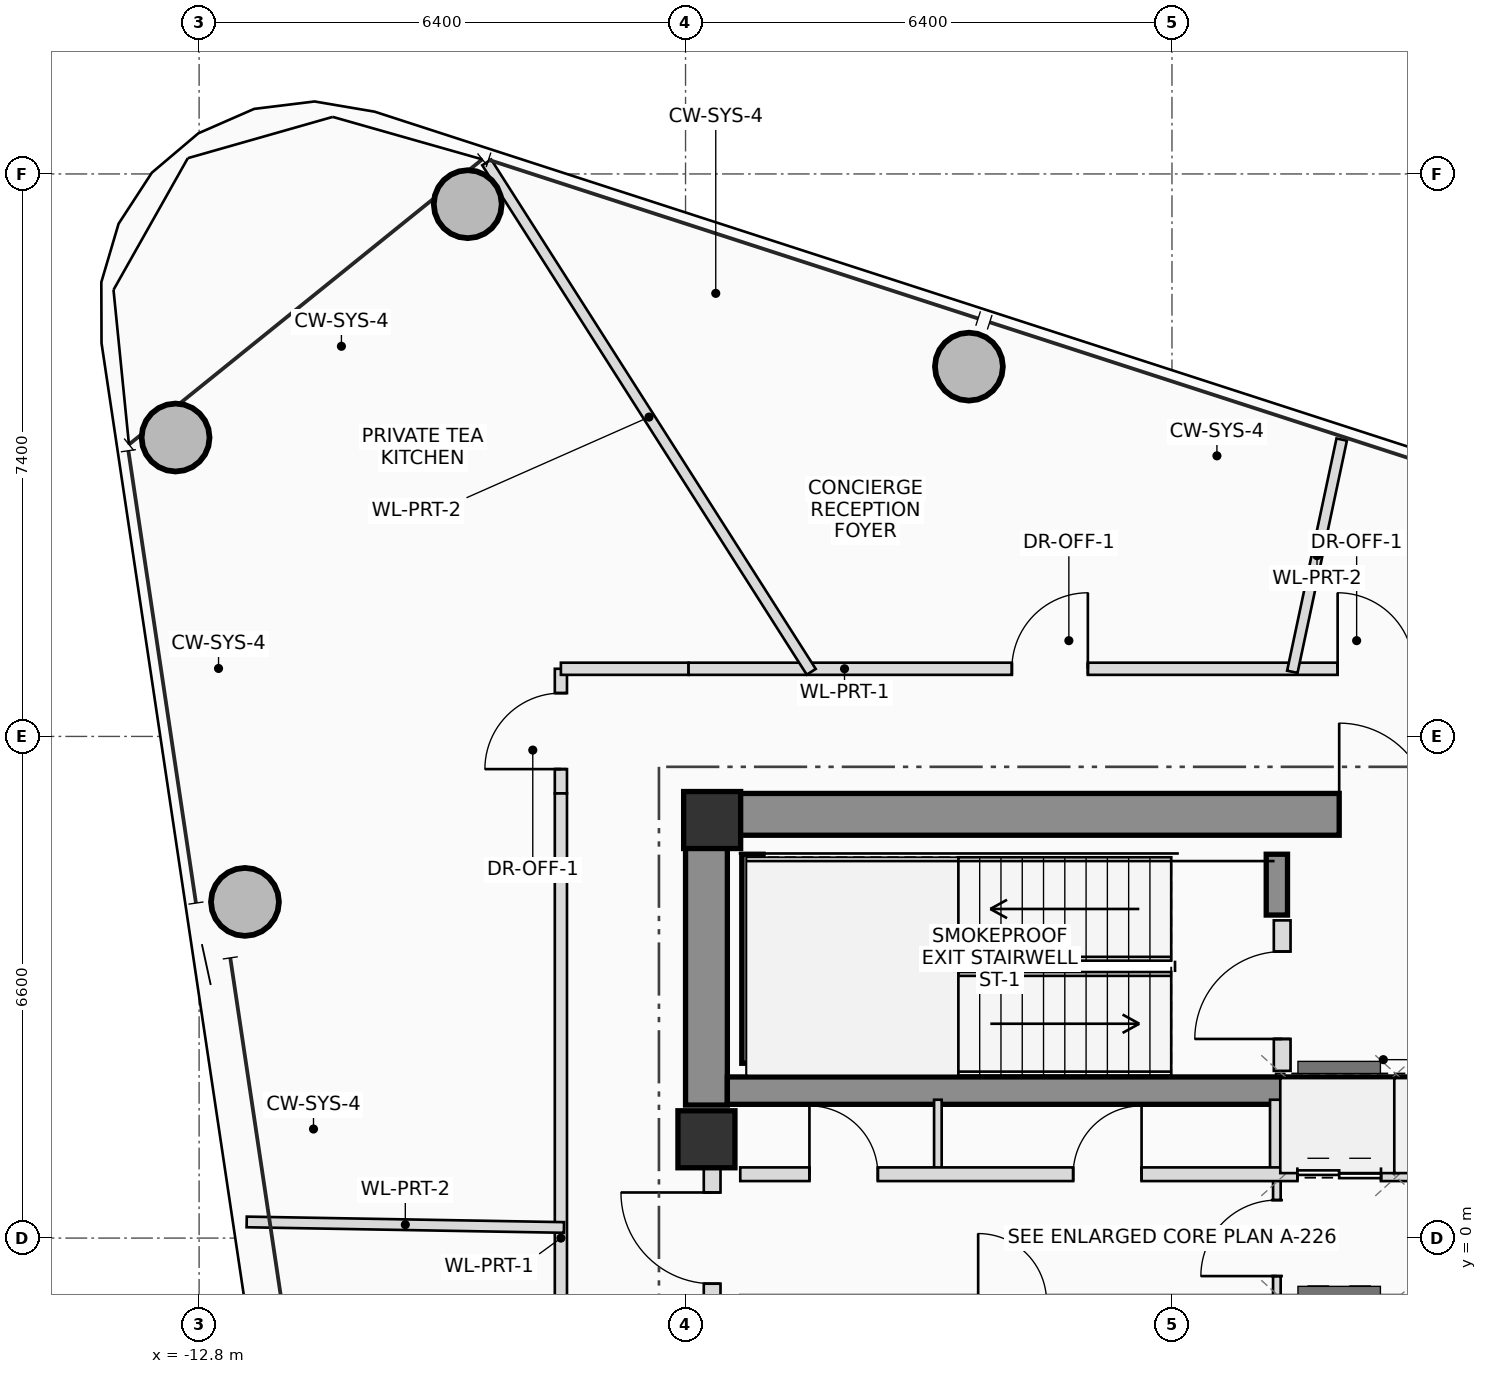
"""IFC4 building model, lengths in metres.
Left out: names, types, materials, properties, quantities, classifications, styles, units other than length and angle.
Written with IfcOpenShell. Run it as: python <this file> out.ifc"""

import sys

from ifc_helpers import new_model, si_unit, direction, frame, frame_2d, origin, origin_2d, place, context, subcontext, project, spatial, rectangle, hollow_circle, extrude, source, transform, mapped, element, fill, save


model = new_model("IFC4")
c1 = context("Model", 3, precision=1e-05, world=origin(), true_north=direction((0.0, 1.0)))
c2 = subcontext(c1, "Body", "Model", "MODEL_VIEW")
j1 = project(units=[si_unit("LENGTHUNIT", "METRE"), si_unit("PLANEANGLEUNIT", "RADIAN")], contexts=[c1])
p1 = place(None, origin())
s1 = spatial("IfcSite", under=j1, at=p1, CompositionType="ELEMENT")
p2 = place(p1, origin())
s2 = spatial("IfcBuilding", under=s1, at=p2, CompositionType="ELEMENT")
p3 = place(p2, frame((0.0, 0.0, 281.35)))
s3 = spatial("IfcBuildingStorey", under=s2, at=p3, CompositionType="ELEMENT", Elevation=281.35)
m1 = source(origin(), c2, "Body", "SweptSolid", [
    extrude(rectangle(XDim=0.75, YDim=0.75, at=origin_2d()), origin(), (0.0, 0.0, 1.0), 3.4),
])
p4 = place(p3, frame((-6.05, 5.5, 0.0), z_axis=(0.0, 0.0, 1.0), x_axis=(1.0, 0.0, 0.0)))
e1 = element("IfcColumn", 1, at=p4, inside=s3, PredefinedType="COLUMN", context=c2, shape_type="MappedRepresentation", body=[
    mapped(m1, transform((0.0, 0.0, 0.0), scale=1.0)),
])
p5 = place(p3, frame((-6.4, 5.575, 0.0), z_axis=(0.0, 0.0, 1.0), x_axis=(1.0, 0.0, 0.0)))
e2 = element("IfcWall", 2, at=p5, inside=s3, PredefinedType="SHEAR", context=c2, shape_type="SweptSolid", body=[
    extrude(rectangle(XDim=12.8, YDim=0.55, at=frame_2d((6.4, 0.0))), origin(), (0.0, 0.0, 1.0), 3.4),
])
p6 = place(p5, frame((8.6, 0.0, 0.0)))
e3 = element("IfcOpeningElement", 3, at=p6, cuts=e2, PredefinedType="OPENING", context=c2, shape_type="SweptSolid", body=[
    extrude(rectangle(XDim=1.2, YDim=2.2, at=frame_2d((0.6, 1.1))), frame((0.0, 0.285, 0.0), z_axis=(0.0, -1.0, 0.0), x_axis=(1.0, 0.0, 0.0)), (0.0, 0.0, 1.0), 0.57),
])
p7 = place(p3, frame((-6.125, 1.75, 0.0), z_axis=(0.0, 0.0, 1.0), x_axis=(0.0, 1.0, 0.0)))
e4 = element("IfcWall", 4, at=p7, inside=s3, PredefinedType="SHEAR", context=c2, shape_type="SweptSolid", body=[
    extrude(rectangle(XDim=3.55, YDim=0.55, at=frame_2d((1.775, 0.0))), origin(), (0.0, 0.0, 1.0), 3.4),
])
p8 = place(p3, frame((-5.85, 1.94, 0.0), z_axis=(0.0, 0.0, 1.0), x_axis=(1.0, 0.0, 0.0)))
e5 = element("IfcWall", 5, at=p8, inside=s3, PredefinedType="SHEAR", context=c2, shape_type="SweptSolid", body=[
    extrude(rectangle(XDim=11.7, YDim=0.36, at=frame_2d((5.85, 0.0))), origin(), (0.0, 0.0, 1.0), 3.4),
])
p9 = place(p3, frame((-5.52, 2.3, 0.0), z_axis=(0.0, 0.0, 1.0), x_axis=(0.0, 1.0, 0.0)))
e6 = element("IfcWall", 6, at=p9, inside=s3, PredefinedType="SHEAR", context=c2, shape_type="SweptSolid", body=[
    extrude(rectangle(XDim=2.75, YDim=0.28, at=frame_2d((1.375, 0.0))), origin(), (0.0, 0.0, 1.0), 3.4),
])
p10 = place(p3, frame((1.38, 4.25, 0.0), z_axis=(0.0, 0.0, 1.0), x_axis=(0.0, 1.0, 0.0)))
e7 = element("IfcWall", 7, at=p10, inside=s3, PredefinedType="SHEAR", context=c2, shape_type="SweptSolid", body=[
    extrude(rectangle(XDim=0.8, YDim=0.28, at=frame_2d((0.4, 0.0))), origin(), (0.0, 0.0, 1.0), 3.4),
])
p11 = place(p3, frame((-6.125, 1.3, 0.0), z_axis=(0.0, 0.0, 1.0), x_axis=(1.0, 0.0, 0.0)))
e8 = element("IfcColumn", 8, at=p11, inside=s3, PredefinedType="COLUMN", context=c2, shape_type="MappedRepresentation", body=[
    mapped(m1, transform((0.0, 0.0, 0.0), scale=1.0)),
])
m2 = source(origin(), c2, "Body", "SweptSolid", [
    extrude(hollow_circle(Radius=0.45, WallThickness=0.032, at=origin_2d()), origin(), (0.0, 0.0, 1.0), 3.4),
])
for number, where, z_axis, x_axis in (
    (9, (-2.672, 11.465, 0.0), (0.0, 0.0, 1.0), (1.0, 0.0, 0.0)),
    (10, (-9.266, 13.602, 0.0), (0.0, 0.0, 1.0), (1.0, 0.0, 0.0)),
    (11, (-13.11, 10.532, 0.0), (0.0, 0.0, 1.0), (1.0, 0.0, 0.0)),
    (12, (-12.197, 4.423, 0.0), (0.0, 0.0, 1.0), (1.0, 0.0, 0.0)),
):
    element("IfcColumn", number, at=place(p3, frame(where, z_axis=z_axis, x_axis=x_axis)), inside=s3, PredefinedType="COLUMN", context=c2, shape_type="MappedRepresentation", body=[
        mapped(m2, transform((0.0, 0.0, 0.0), scale=1.0)),
    ])
p12 = place(p3, frame((-6.05, -0.95, 0.0), z_axis=(0.0, 0.0, 1.0), x_axis=(0.0, 1.0, 0.0)))
e13 = element("IfcWall", 13, at=p12, inside=s3, PredefinedType="PLUMBINGWALL", context=c2, shape_type="SweptSolid", body=[
    extrude(rectangle(XDim=1.9, YDim=0.22, at=frame_2d((0.95, 0.0))), origin(), (0.0, 0.0, 1.0), 2.14),
])
p13 = place(p12, frame((0.35, 0.0, 0.0)))
e14 = element("IfcOpeningElement", 14, at=p13, cuts=e13, PredefinedType="OPENING", context=c2, shape_type="SweptSolid", body=[
    extrude(rectangle(XDim=1.2, YDim=2.2, at=frame_2d((0.6, 1.1))), frame((0.0, 0.12, 0.0), z_axis=(0.0, -1.0, 0.0), x_axis=(1.0, 0.0, 0.0)), (0.0, 0.0, 1.0), 0.24),
])
p14 = place(p3, frame((1.45, 2.2, 0.0), z_axis=(0.0, 0.0, 1.0), x_axis=(0.0, 1.0, 0.0)))
e15 = element("IfcWall", 15, at=p14, inside=s3, PredefinedType="PLUMBINGWALL", context=c2, shape_type="SweptSolid", body=[
    extrude(rectangle(XDim=1.98, YDim=0.22, at=frame_2d((0.99, 0.0))), origin(), (0.0, 0.0, 1.0), 3.16),
])
p15 = place(p14, frame((0.42, 0.0, 0.0)))
e16 = element("IfcOpeningElement", 16, at=p15, cuts=e15, PredefinedType="OPENING", context=c2, shape_type="SweptSolid", body=[
    extrude(rectangle(XDim=1.15, YDim=2.15, at=frame_2d((0.575, 1.075))), frame((0.0, 0.12, 0.0), z_axis=(0.0, -1.0, 0.0), x_axis=(1.0, 0.0, 0.0)), (0.0, 0.0, 1.0), 0.24),
])
p16 = place(p3, frame((1.38, -0.84, 0.0), z_axis=(0.0, 0.0, 1.0), x_axis=(0.0, 1.0, 0.0)))
e17 = element("IfcWall", 17, at=p16, inside=s3, PredefinedType="PARTITIONING", context=c2, shape_type="SweptSolid", body=[
    extrude(rectangle(XDim=1.68, YDim=0.1, at=frame_2d((0.84, 0.0))), origin(), (0.0, 0.0, 1.0), 3.16),
])
p17 = place(p16, frame((0.34, 0.0, 0.0)))
e18 = element("IfcOpeningElement", 18, at=p17, cuts=e17, PredefinedType="OPENING", context=c2, shape_type="SweptSolid", body=[
    extrude(rectangle(XDim=1.0, YDim=2.25, at=frame_2d((0.5, 1.125))), frame((0.0, 0.06, 0.0), z_axis=(0.0, -1.0, 0.0), x_axis=(1.0, 0.0, 0.0)), (0.0, 0.0, 1.0), 0.12),
])
p18 = place(p3, frame((-3.08, 0.84, 0.0), z_axis=(0.0, 0.0, 1.0), x_axis=(0.0, 1.0, 0.0)))
e19 = element("IfcWall", 19, at=p18, inside=s3, PredefinedType="PARTITIONING", context=c2, shape_type="SweptSolid", body=[
    extrude(rectangle(XDim=0.98, YDim=0.1, at=frame_2d((0.49, 0.0))), origin(), (0.0, 0.0, 1.0), 3.16),
])
for number, where, z_axis, x_axis in (
    (20, (1.38, 0.84, 0.0), (0.0, 0.0, 1.0), (0.0, 1.0, 0.0)),
    (21, (3.02, 0.84, 0.0), (0.0, 0.0, 1.0), (0.0, 1.0, 0.0)),
):
    element("IfcWall", number, at=place(p3, frame(where, z_axis=z_axis, x_axis=x_axis)), inside=s3, PredefinedType="PLUMBINGWALL", context=c2, shape_type="SweptSolid", body=[
        extrude(rectangle(XDim=0.98, YDim=0.18, at=frame_2d((0.49, 0.0))), origin(), (0.0, 0.0, 1.0), 3.16),
    ])
p19 = place(p3, frame((-5.68, 0.84, 0.0), z_axis=(0.0, 0.0, 1.0), x_axis=(1.0, 0.0, 0.0)))
e22 = element("IfcWall", 22, at=p19, inside=s3, PredefinedType="PLUMBINGWALL", context=c2, shape_type="SweptSolid", body=[
    extrude(rectangle(XDim=10.26, YDim=0.18, at=frame_2d((5.13, 0.0))), origin(), (0.0, 0.0, 1.0), 3.16),
])
p20 = place(p19, frame((0.91, 0.0, 0.0)))
e23 = element("IfcOpeningElement", 23, at=p20, cuts=e22, PredefinedType="OPENING", context=c2, shape_type="SweptSolid", body=[
    extrude(rectangle(XDim=0.9, YDim=2.05, at=frame_2d((0.45, 1.025))), frame((0.0, 0.1, 0.0), z_axis=(0.0, -1.0, 0.0), x_axis=(1.0, 0.0, 0.0)), (0.0, 0.0, 1.0), 0.2),
])
p21 = place(p19, frame((4.38, 0.0, 0.0)))
e24 = element("IfcOpeningElement", 24, at=p21, cuts=e22, PredefinedType="OPENING", context=c2, shape_type="SweptSolid", body=[
    extrude(rectangle(XDim=0.9, YDim=2.05, at=frame_2d((0.45, 1.025))), frame((0.0, 0.1, 0.0), z_axis=(0.0, -1.0, 0.0), x_axis=(1.0, 0.0, 0.0)), (0.0, 0.0, 1.0), 0.2),
])
p22 = place(p19, frame((7.33, 0.0, 0.0)))
e25 = element("IfcOpeningElement", 25, at=p22, cuts=e22, PredefinedType="OPENING", context=c2, shape_type="SweptSolid", body=[
    extrude(rectangle(XDim=1.1, YDim=2.2, at=frame_2d((0.55, 1.1))), frame((0.0, 0.1, 0.0), z_axis=(0.0, -1.0, 0.0), x_axis=(1.0, 0.0, 0.0)), (0.0, 0.0, 1.0), 0.2),
])
p23 = place(p19, frame((8.83, 0.0, 0.0)))
e26 = element("IfcOpeningElement", 26, at=p23, cuts=e22, PredefinedType="OPENING", context=c2, shape_type="SweptSolid", body=[
    extrude(rectangle(XDim=1.1, YDim=2.2, at=frame_2d((0.55, 1.1))), frame((0.0, 0.1, 0.0), z_axis=(0.0, -1.0, 0.0), x_axis=(1.0, 0.0, 0.0)), (0.0, 0.0, 1.0), 0.2),
])
p24 = place(p3, frame((-8.04, 5.85, 0.0), z_axis=(0.0, 0.0, 1.0), x_axis=(0.0, 1.0, 0.0)))
e27 = element("IfcWall", 27, at=p24, inside=s3, PredefinedType="PARTITIONING", context=c2, shape_type="SweptSolid", body=[
    extrude(rectangle(XDim=1.64, YDim=0.16, at=frame_2d((0.82, 0.0))), origin(), (0.0, 0.0, 1.0), 2.565),
])
p25 = place(p24, frame((0.32, 0.0, 0.0)))
e28 = element("IfcOpeningElement", 28, at=p25, cuts=e27, PredefinedType="OPENING", context=c2, shape_type="SweptSolid", body=[
    extrude(rectangle(XDim=1.0, YDim=2.25, at=frame_2d((0.5, 1.125))), frame((0.0, 0.09, 0.0), z_axis=(0.0, -1.0, 0.0), x_axis=(1.0, 0.0, 0.0)), (0.0, 0.0, 1.0), 0.18),
])
p26 = place(p3, frame((-8.04, 7.49, 0.0), z_axis=(0.0, 0.0, 1.0), x_axis=(1.0, 0.0, 0.0)))
e29 = element("IfcWall", 29, at=p26, inside=s3, PredefinedType="PARTITIONING", context=c2, shape_type="SweptSolid", body=[
    extrude(rectangle(XDim=1.68, YDim=0.16, at=frame_2d((0.84, 0.0))), origin(), (0.0, 0.0, 1.0), 2.565),
])
p27 = place(p3, frame((-6.36, 7.49, 0.0), z_axis=(0.0, 0.0, 1.0), x_axis=(1.0, 0.0, 0.0)))
e30 = element("IfcWall", 30, at=p27, inside=s3, PredefinedType="PARTITIONING", context=c2, shape_type="SweptSolid", body=[
    extrude(rectangle(XDim=9.81, YDim=0.16, at=frame_2d((4.905, 0.0))), origin(), (0.0, 0.0, 1.0), 2.565),
])
p28 = place(p27, frame((4.253, 0.0, 0.0)))
e31 = element("IfcOpeningElement", 31, at=p28, cuts=e30, PredefinedType="OPENING", context=c2, shape_type="SweptSolid", body=[
    extrude(rectangle(XDim=1.0, YDim=2.25, at=frame_2d((0.5, 1.125))), frame((0.0, 0.09, 0.0), z_axis=(0.0, -1.0, 0.0), x_axis=(1.0, 0.0, 0.0)), (0.0, 0.0, 1.0), 0.18),
])
p29 = place(p27, frame((8.54, 0.0, 0.0)))
e32 = element("IfcOpeningElement", 32, at=p29, cuts=e30, PredefinedType="OPENING", context=c2, shape_type="SweptSolid", body=[
    extrude(rectangle(XDim=1.0, YDim=2.25, at=frame_2d((0.5, 1.125))), frame((0.0, 0.09, 0.0), z_axis=(0.0, -1.0, 0.0), x_axis=(1.0, 0.0, 0.0)), (0.0, 0.0, 1.0), 0.18),
])
p30 = place(p3, frame((-8.04, -5.85, 0.0), z_axis=(0.0, 0.0, 1.0), x_axis=(0.0, 1.0, 0.0)))
e33 = element("IfcWall", 33, at=p30, inside=s3, PredefinedType="PARTITIONING", context=c2, shape_type="SweptSolid", body=[
    extrude(rectangle(XDim=11.7, YDim=0.16, at=frame_2d((5.85, 0.0))), origin(), (0.0, 0.0, 1.0), 2.565),
])
p31 = place(p3, frame((1.583, 7.45, 0.0), z_axis=(0.0, 0.0, 1.0), x_axis=(0.20788492722, 0.978153289129, 0.0)))
e34 = element("IfcWall", 34, at=p31, inside=s3, PredefinedType="PARTITIONING", context=c2, shape_type="SweptSolid", body=[
    extrude(rectangle(XDim=3.124, YDim=0.14, at=frame_2d((1.562, 0.0))), origin(), (0.0, 0.0, 1.0), 2.725),
])
p32 = place(p3, frame((-4.746, 7.45, 0.0), z_axis=(0.0, 0.0, 1.0), x_axis=(-0.537302825122, 0.843389396492, 0.0)))
e35 = element("IfcWall", 35, at=p32, inside=s3, PredefinedType="PARTITIONING", context=c2, shape_type="SweptSolid", body=[
    extrude(rectangle(XDim=7.947, YDim=0.14, at=frame_2d((3.973, 0.0))), origin(), (0.0, 0.0, 1.0), 2.565),
])
p33 = place(p3, frame((-8.0, 0.14, 0.0), z_axis=(0.0, 0.0, 1.0), x_axis=(-0.999848132876, 0.017427311435, 0.0)))
e36 = element("IfcWall", 36, at=p33, inside=s3, PredefinedType="PARTITIONING", context=c2, shape_type="SweptSolid", body=[
    extrude(rectangle(XDim=4.175, YDim=0.14, at=frame_2d((2.087, 0.0))), origin(), (0.0, 0.0, 1.0), 2.725),
])
p34 = place(p6, origin())
e37 = element("IfcDoor", 37, at=p34, inside=s3, OperationType="SINGLE_SWING_LEFT", PredefinedType="DOOR", context=c2, shape_type="SweptSolid", body=[
    extrude(rectangle(XDim=1.2, YDim=2.2, at=frame_2d((0.6, 1.1))), frame((0.0, 0.025, 0.0), z_axis=(0.0, -1.0, 0.0), x_axis=(1.0, 0.0, 0.0)), (0.0, 0.0, 1.0), 0.05),
])
fill(e3, e37)
p35 = place(p13, origin())
e38 = element("IfcDoor", 38, at=p35, inside=s3, OperationType="SINGLE_SWING_RIGHT", PredefinedType="DOOR", context=c2, shape_type="SweptSolid", body=[
    extrude(rectangle(XDim=1.2, YDim=2.2, at=frame_2d((0.6, 1.1))), frame((0.0, 0.025, 0.0), z_axis=(0.0, -1.0, 0.0), x_axis=(1.0, 0.0, 0.0)), (0.0, 0.0, 1.0), 0.05),
])
fill(e14, e38)
p36 = place(p15, origin())
e39 = element("IfcDoor", 39, at=p36, inside=s3, OperationType="SINGLE_SWING_LEFT", PredefinedType="DOOR", context=c2, shape_type="SweptSolid", body=[
    extrude(rectangle(XDim=1.15, YDim=2.15, at=frame_2d((0.575, 1.075))), frame((0.0, 0.025, 0.0), z_axis=(0.0, -1.0, 0.0), x_axis=(1.0, 0.0, 0.0)), (0.0, 0.0, 1.0), 0.05),
])
fill(e16, e39)
p37 = place(p17, origin())
e40 = element("IfcDoor", 40, at=p37, inside=s3, OperationType="SINGLE_SWING_LEFT", PredefinedType="DOOR", context=c2, shape_type="SweptSolid", body=[
    extrude(rectangle(XDim=1.0, YDim=2.25, at=frame_2d((0.5, 1.125))), frame((0.0, 0.025, 0.0), z_axis=(0.0, -1.0, 0.0), x_axis=(1.0, 0.0, 0.0)), (0.0, 0.0, 1.0), 0.05),
])
fill(e18, e40)
p38 = place(p20, origin())
e41 = element("IfcDoor", 41, at=p38, inside=s3, OperationType="SINGLE_SWING_LEFT", PredefinedType="DOOR", context=c2, shape_type="SweptSolid", body=[
    extrude(rectangle(XDim=0.9, YDim=2.05, at=frame_2d((0.45, 1.025))), frame((0.0, 0.025, 0.0), z_axis=(0.0, -1.0, 0.0), x_axis=(1.0, 0.0, 0.0)), (0.0, 0.0, 1.0), 0.05),
])
fill(e23, e41)
p39 = place(p21, origin())
e42 = element("IfcDoor", 42, at=p39, inside=s3, OperationType="SINGLE_SWING_RIGHT", PredefinedType="DOOR", context=c2, shape_type="SweptSolid", body=[
    extrude(rectangle(XDim=0.9, YDim=2.05, at=frame_2d((0.45, 1.025))), frame((0.0, 0.025, 0.0), z_axis=(0.0, -1.0, 0.0), x_axis=(1.0, 0.0, 0.0)), (0.0, 0.0, 1.0), 0.05),
])
fill(e24, e42)
p40 = place(p22, origin())
e43 = element("IfcDoor", 43, at=p40, inside=s3, OperationType="DOUBLE_DOOR_SLIDING", PredefinedType="DOOR", context=c2, shape_type="SweptSolid", body=[
    extrude(rectangle(XDim=1.1, YDim=2.2, at=frame_2d((0.55, 1.1))), frame((0.0, 0.025, 0.0), z_axis=(0.0, -1.0, 0.0), x_axis=(1.0, 0.0, 0.0)), (0.0, 0.0, 1.0), 0.05),
])
fill(e25, e43)
p41 = place(p25, origin())
e44 = element("IfcDoor", 44, at=p41, inside=s3, OperationType="SINGLE_SWING_LEFT", PredefinedType="DOOR", context=c2, shape_type="SweptSolid", body=[
    extrude(rectangle(XDim=1.0, YDim=2.25, at=frame_2d((0.5, 1.125))), frame((0.0, 0.025, 0.0), z_axis=(0.0, -1.0, 0.0), x_axis=(1.0, 0.0, 0.0)), (0.0, 0.0, 1.0), 0.05),
])
fill(e28, e44)
p42 = place(p28, origin())
e45 = element("IfcDoor", 45, at=p42, inside=s3, OperationType="SINGLE_SWING_RIGHT", PredefinedType="DOOR", context=c2, shape_type="SweptSolid", body=[
    extrude(rectangle(XDim=1.0, YDim=2.25, at=frame_2d((0.5, 1.125))), frame((0.0, 0.025, 0.0), z_axis=(0.0, -1.0, 0.0), x_axis=(1.0, 0.0, 0.0)), (0.0, 0.0, 1.0), 0.05),
])
fill(e31, e45)
p43 = place(p29, origin())
e46 = element("IfcDoor", 46, at=p43, inside=s3, OperationType="SINGLE_SWING_LEFT", PredefinedType="DOOR", context=c2, shape_type="SweptSolid", body=[
    extrude(rectangle(XDim=1.0, YDim=2.25, at=frame_2d((0.5, 1.125))), frame((0.0, 0.025, 0.0), z_axis=(0.0, -1.0, 0.0), x_axis=(1.0, 0.0, 0.0)), (0.0, 0.0, 1.0), 0.05),
])
fill(e32, e46)
save(model, sys.argv[1])
